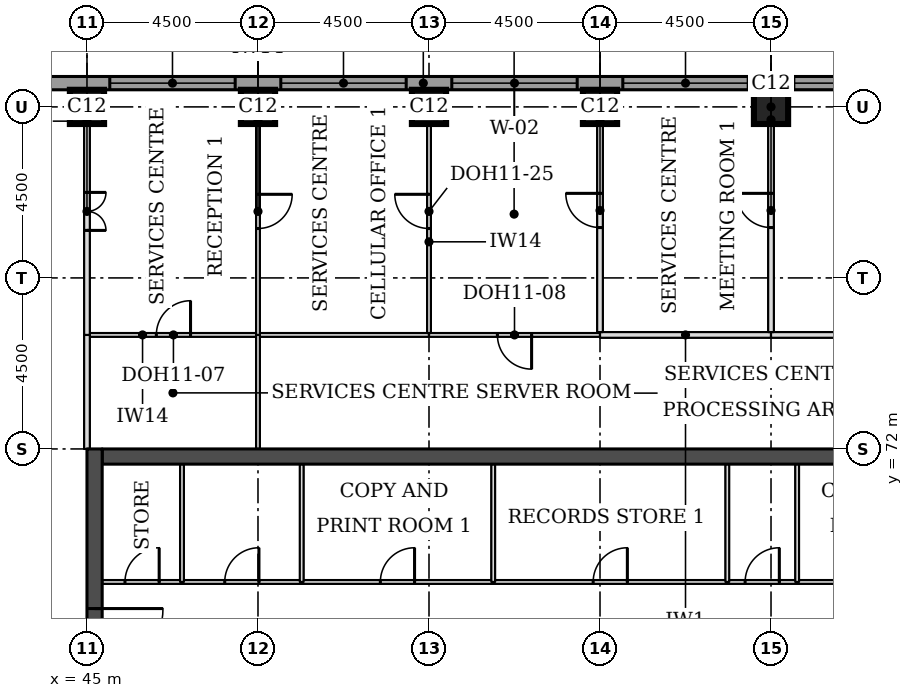
"""IFC4 building model, lengths in metres.
Left out: names, types, materials, properties, quantities, classifications, styles, units other than length and angle.
Written with IfcOpenShell. Run it as: python <this file> out.ifc"""

import sys

from ifc_helpers import new_model, si_unit, direction, frame, frame_2d, origin, origin_2d, place, context, subcontext, project, spatial, rectangle, extrude, element, fill, save


model = new_model("IFC4")
c1 = context("Model", 3, precision=1e-05, world=origin(), true_north=direction((0.0, 1.0)))
c2 = subcontext(c1, "Body", "Model", "MODEL_VIEW")
j1 = project(units=[si_unit("LENGTHUNIT", "METRE"), si_unit("PLANEANGLEUNIT", "RADIAN")], contexts=[c1])
p1 = place(None, origin())
s1 = spatial("IfcSite", under=j1, at=p1, CompositionType="ELEMENT")
p2 = place(p1, origin())
s2 = spatial("IfcBuilding", under=s1, at=p2, CompositionType="ELEMENT")
p3 = place(p2, frame((0.0, 0.0, 237.8)))
s3 = spatial("IfcBuildingStorey", under=s2, at=p3, CompositionType="ELEMENT", Elevation=237.8)
for number, where, z_axis, x_axis in (
    (1, (45.0, 81.0, 0.0), (0.0, 0.0, 1.0), (1.0, 0.0, 0.0)),
    (2, (49.5, 81.0, 0.0), (0.0, 0.0, 1.0), (1.0, 0.0, 0.0)),
    (3, (54.0, 81.0, 0.0), (0.0, 0.0, 1.0), (1.0, 0.0, 0.0)),
    (4, (58.5, 81.0, 0.0), (0.0, 0.0, 1.0), (1.0, 0.0, 0.0)),
    (5, (63.0, 81.0, 0.0), (0.0, 0.0, 1.0), (1.0, 0.0, 0.0)),
):
    element("IfcColumn", number, at=place(p3, frame(where, z_axis=z_axis, x_axis=x_axis)), inside=s3, PredefinedType="COLUMN", context=c2, shape_type="SweptSolid", body=[
        extrude(rectangle(XDim=0.9, YDim=0.9, at=origin_2d()), origin(), (0.0, 0.0, 1.0), 3.7),
    ])
p4 = place(p3, frame((45.4, 71.8, 0.0), z_axis=(0.0, 0.0, 1.0), x_axis=(1.0, 0.0, 0.0)))
e6 = element("IfcWall", 6, at=p4, inside=s3, PredefinedType="SHEAR", context=c2, shape_type="SweptSolid", body=[
    extrude(rectangle(XDim=21.7, YDim=0.4, at=frame_2d((10.85, 0.0))), origin(), (0.0, 0.0, 1.0), 3.7),
])
p5 = place(p3, frame((45.2, 49.5, 0.0), z_axis=(0.0, 0.0, 1.0), x_axis=(0.0, 1.0, 0.0)))
e7 = element("IfcWall", 7, at=p5, inside=s3, PredefinedType="SHEAR", context=c2, shape_type="SweptSolid", body=[
    extrude(rectangle(XDim=22.5, YDim=0.4, at=frame_2d((11.25, 0.0))), origin(), (0.0, 0.0, 1.0), 3.7),
])
p6 = place(p5, frame((4.2, 0.0, 0.0)))
e8 = element("IfcOpeningElement", 8, at=p6, cuts=e7, PredefinedType="OPENING", context=c2, shape_type="SweptSolid", body=[
    extrude(rectangle(XDim=1.8, YDim=2.1, at=frame_2d((0.9, 1.05))), frame((0.0, 0.21, 0.0), z_axis=(0.0, -1.0, 0.0), x_axis=(1.0, 0.0, 0.0)), (0.0, 0.0, 1.0), 0.42),
])
p7 = place(p5, frame((6.9, 0.0, 0.0)))
e9 = element("IfcOpeningElement", 9, at=p7, cuts=e7, PredefinedType="OPENING", context=c2, shape_type="SweptSolid", body=[
    extrude(rectangle(XDim=1.1, YDim=2.1, at=frame_2d((0.55, 1.05))), frame((0.0, 0.21, 0.0), z_axis=(0.0, -1.0, 0.0), x_axis=(1.0, 0.0, 0.0)), (0.0, 0.0, 1.0), 0.42),
])
p8 = place(p5, frame((13.6, 0.0, 0.0)))
e10 = element("IfcOpeningElement", 10, at=p8, cuts=e7, PredefinedType="OPENING", context=c2, shape_type="SweptSolid", body=[
    extrude(rectangle(XDim=1.1, YDim=2.1, at=frame_2d((0.55, 1.05))), frame((0.0, 0.21, 0.0), z_axis=(0.0, -1.0, 0.0), x_axis=(1.0, 0.0, 0.0)), (0.0, 0.0, 1.0), 0.42),
])
p9 = place(p5, frame((16.5, 0.0, 0.0)))
e11 = element("IfcOpeningElement", 11, at=p9, cuts=e7, PredefinedType="OPENING", context=c2, shape_type="SweptSolid", body=[
    extrude(rectangle(XDim=1.8, YDim=2.1, at=frame_2d((0.9, 1.05))), frame((0.0, 0.21, 0.0), z_axis=(0.0, -1.0, 0.0), x_axis=(1.0, 0.0, 0.0)), (0.0, 0.0, 1.0), 0.42),
])
p10 = place(p3, frame((72.331, 81.625, 0.0), z_axis=(0.0, 0.0, 1.0), x_axis=(-1.0, 0.0, 0.0)))
e12 = element("IfcWall", 12, at=p10, inside=s3, PredefinedType="STANDARD", context=c2, shape_type="SweptSolid", body=[
    extrude(rectangle(XDim=32.163, YDim=0.35, at=frame_2d((16.081, 0.0))), origin(), (0.0, 0.0, 1.0), 3.525),
])
p11 = place(p10, frame((5.431, 0.0, 0.9)))
e13 = element("IfcOpeningElement", 13, at=p11, cuts=e12, PredefinedType="OPENING", context=c2, shape_type="SweptSolid", body=[
    extrude(rectangle(XDim=3.3, YDim=1.9, at=frame_2d((1.65, 0.95))), frame((0.0, 0.185, 0.0), z_axis=(0.0, -1.0, 0.0), x_axis=(1.0, 0.0, 0.0)), (0.0, 0.0, 1.0), 0.37),
])
p12 = place(p10, frame((9.931, 0.0, 0.9)))
e14 = element("IfcOpeningElement", 14, at=p12, cuts=e12, PredefinedType="OPENING", context=c2, shape_type="SweptSolid", body=[
    extrude(rectangle(XDim=3.3, YDim=1.9, at=frame_2d((1.65, 0.95))), frame((0.0, 0.185, 0.0), z_axis=(0.0, -1.0, 0.0), x_axis=(1.0, 0.0, 0.0)), (0.0, 0.0, 1.0), 0.37),
])
p13 = place(p10, frame((14.431, 0.0, 0.9)))
e15 = element("IfcOpeningElement", 15, at=p13, cuts=e12, PredefinedType="OPENING", context=c2, shape_type="SweptSolid", body=[
    extrude(rectangle(XDim=3.3, YDim=1.9, at=frame_2d((1.65, 0.95))), frame((0.0, 0.185, 0.0), z_axis=(0.0, -1.0, 0.0), x_axis=(1.0, 0.0, 0.0)), (0.0, 0.0, 1.0), 0.37),
])
p14 = place(p10, frame((18.931, 0.0, 0.9)))
e16 = element("IfcOpeningElement", 16, at=p14, cuts=e12, PredefinedType="OPENING", context=c2, shape_type="SweptSolid", body=[
    extrude(rectangle(XDim=3.3, YDim=1.9, at=frame_2d((1.65, 0.95))), frame((0.0, 0.185, 0.0), z_axis=(0.0, -1.0, 0.0), x_axis=(1.0, 0.0, 0.0)), (0.0, 0.0, 1.0), 0.37),
])
p15 = place(p10, frame((23.431, 0.0, 0.9)))
e17 = element("IfcOpeningElement", 17, at=p15, cuts=e12, PredefinedType="OPENING", context=c2, shape_type="SweptSolid", body=[
    extrude(rectangle(XDim=3.3, YDim=1.9, at=frame_2d((1.65, 0.95))), frame((0.0, 0.185, 0.0), z_axis=(0.0, -1.0, 0.0), x_axis=(1.0, 0.0, 0.0)), (0.0, 0.0, 1.0), 0.37),
])
p16 = place(p3, frame((45.075, 75.0, 0.0), z_axis=(0.0, 0.0, 1.0), x_axis=(1.0, 0.0, 0.0)))
e18 = element("IfcWall", 18, at=p16, inside=s3, PredefinedType="PARTITIONING", context=c2, shape_type="SweptSolid", body=[
    extrude(rectangle(XDim=4.375, YDim=0.1, at=frame_2d((2.188, 0.0))), origin(), (0.0, 0.0, 1.0), 3.55),
])
p17 = place(p16, frame((1.75, 0.0, 0.0)))
e19 = element("IfcOpeningElement", 19, at=p17, cuts=e18, PredefinedType="OPENING", context=c2, shape_type="SweptSolid", body=[
    extrude(rectangle(XDim=0.9, YDim=2.1, at=frame_2d((0.45, 1.05))), frame((0.0, 0.06, 0.0), z_axis=(0.0, -1.0, 0.0), x_axis=(1.0, 0.0, 0.0)), (0.0, 0.0, 1.0), 0.12),
])
p18 = place(p3, frame((49.55, 75.0, 0.0), z_axis=(0.0, 0.0, 1.0), x_axis=(1.0, 0.0, 0.0)))
e20 = element("IfcWall", 20, at=p18, inside=s3, PredefinedType="PARTITIONING", context=c2, shape_type="SweptSolid", body=[
    extrude(rectangle(XDim=4.45, YDim=0.1, at=frame_2d((2.225, 0.0))), origin(), (0.0, 0.0, 1.0), 3.55),
])
p19 = place(p3, frame((54.0, 75.0, 0.0), z_axis=(0.0, 0.0, 1.0), x_axis=(1.0, 0.0, 0.0)))
e21 = element("IfcWall", 21, at=p19, inside=s3, PredefinedType="PARTITIONING", context=c2, shape_type="SweptSolid", body=[
    extrude(rectangle(XDim=4.5, YDim=0.1, at=frame_2d((2.25, 0.0))), origin(), (0.0, 0.0, 1.0), 3.55),
])
p20 = place(p19, frame((1.8, 0.0, 0.0)))
e22 = element("IfcOpeningElement", 22, at=p20, cuts=e21, PredefinedType="OPENING", context=c2, shape_type="SweptSolid", body=[
    extrude(rectangle(XDim=0.9, YDim=2.1, at=frame_2d((0.45, 1.05))), frame((0.0, 0.06, 0.0), z_axis=(0.0, -1.0, 0.0), x_axis=(1.0, 0.0, 0.0)), (0.0, 0.0, 1.0), 0.12),
])
p21 = place(p3, frame((58.5, 75.0, 0.0), z_axis=(0.0, 0.0, 1.0), x_axis=(1.0, 0.0, 0.0)))
e23 = element("IfcWall", 23, at=p21, inside=s3, PredefinedType="PARTITIONING", context=c2, shape_type="SweptSolid", body=[
    extrude(rectangle(XDim=4.5, YDim=0.15, at=frame_2d((2.25, 0.0))), origin(), (0.0, 0.0, 1.0), 3.55),
])
p22 = place(p3, frame((63.0, 75.0, 0.0), z_axis=(0.0, 0.0, 1.0), x_axis=(1.0, 0.0, 0.0)))
e24 = element("IfcWall", 24, at=p22, inside=s3, PredefinedType="PARTITIONING", context=c2, shape_type="SweptSolid", body=[
    extrude(rectangle(XDim=4.425, YDim=0.15, at=frame_2d((2.212, 0.0))), origin(), (0.0, 0.0, 1.0), 3.55),
])
p23 = place(p3, frame((45.0, 72.0, 0.0), z_axis=(0.0, 0.0, 1.0), x_axis=(0.0, 1.0, 0.0)))
e25 = element("IfcWall", 25, at=p23, inside=s3, PredefinedType="PARTITIONING", context=c2, shape_type="SweptSolid", body=[
    extrude(rectangle(XDim=3.0, YDim=0.15, at=frame_2d((1.5, 0.0))), origin(), (0.0, 0.0, 1.0), 3.022),
])
p24 = place(p3, frame((49.5, 72.0, 0.0), z_axis=(0.0, 0.0, 1.0), x_axis=(0.0, 1.0, 0.0)))
e26 = element("IfcWall", 26, at=p24, inside=s3, PredefinedType="PARTITIONING", context=c2, shape_type="SweptSolid", body=[
    extrude(rectangle(XDim=3.0, YDim=0.1, at=frame_2d((1.5, 0.0))), origin(), (0.0, 0.0, 1.0), 3.55),
])
p25 = place(p3, frame((45.0, 75.0, 0.0), z_axis=(0.0, 0.0, 1.0), x_axis=(0.0, 1.0, 0.0)))
e27 = element("IfcWall", 27, at=p25, inside=s3, PredefinedType="PARTITIONING", context=c2, shape_type="SweptSolid", body=[
    extrude(rectangle(XDim=6.45, YDim=0.15, at=frame_2d((3.225, 0.0))), origin(), (0.0, 0.0, 1.0), 3.022),
])
p26 = place(p25, frame((2.75, 0.0, 0.0)))
e28 = element("IfcOpeningElement", 28, at=p26, cuts=e27, PredefinedType="OPENING", context=c2, shape_type="SweptSolid", body=[
    extrude(rectangle(XDim=1.0, YDim=2.1, at=frame_2d((0.5, 1.05))), frame((0.0, 0.085, 0.0), z_axis=(0.0, -1.0, 0.0), x_axis=(1.0, 0.0, 0.0)), (0.0, 0.0, 1.0), 0.17),
])
p27 = place(p3, frame((49.5, 75.0, 0.0), z_axis=(0.0, 0.0, 1.0), x_axis=(0.0, 1.0, 0.0)))
e29 = element("IfcWall", 29, at=p27, inside=s3, PredefinedType="PARTITIONING", context=c2, shape_type="SweptSolid", body=[
    extrude(rectangle(XDim=6.45, YDim=0.1, at=frame_2d((3.225, 0.0))), origin(), (0.0, 0.0, 1.0), 3.55),
])
p28 = place(p27, frame((2.8, 0.0, 0.0)))
e30 = element("IfcOpeningElement", 30, at=p28, cuts=e29, PredefinedType="OPENING", context=c2, shape_type="SweptSolid", body=[
    extrude(rectangle(XDim=0.9, YDim=2.1, at=frame_2d((0.45, 1.05))), frame((0.0, 0.06, 0.0), z_axis=(0.0, -1.0, 0.0), x_axis=(1.0, 0.0, 0.0)), (0.0, 0.0, 1.0), 0.12),
])
p29 = place(p3, frame((54.0, 75.05, 0.0), z_axis=(0.0, 0.0, 1.0), x_axis=(0.0, 1.0, 0.0)))
e31 = element("IfcWall", 31, at=p29, inside=s3, PredefinedType="PARTITIONING", context=c2, shape_type="SweptSolid", body=[
    extrude(rectangle(XDim=6.4, YDim=0.1, at=frame_2d((3.2, 0.0))), origin(), (0.0, 0.0, 1.0), 3.55),
])
p30 = place(p29, frame((2.75, 0.0, 0.0)))
e32 = element("IfcOpeningElement", 32, at=p30, cuts=e31, PredefinedType="OPENING", context=c2, shape_type="SweptSolid", body=[
    extrude(rectangle(XDim=0.9, YDim=2.1, at=frame_2d((0.45, 1.05))), frame((0.0, 0.06, 0.0), z_axis=(0.0, -1.0, 0.0), x_axis=(1.0, 0.0, 0.0)), (0.0, 0.0, 1.0), 0.12),
])
p31 = place(p3, frame((58.5, 75.075, 0.0), z_axis=(0.0, 0.0, 1.0), x_axis=(0.0, 1.0, 0.0)))
e33 = element("IfcWall", 33, at=p31, inside=s3, PredefinedType="PARTITIONING", context=c2, shape_type="SweptSolid", body=[
    extrude(rectangle(XDim=6.375, YDim=0.15, at=frame_2d((3.188, 0.0))), origin(), (0.0, 0.0, 1.0), 3.55),
])
p32 = place(p31, frame((2.75, 0.0, 0.0)))
e34 = element("IfcOpeningElement", 34, at=p32, cuts=e33, PredefinedType="OPENING", context=c2, shape_type="SweptSolid", body=[
    extrude(rectangle(XDim=0.9, YDim=2.1, at=frame_2d((0.45, 1.05))), frame((0.0, 0.085, 0.0), z_axis=(0.0, -1.0, 0.0), x_axis=(1.0, 0.0, 0.0)), (0.0, 0.0, 1.0), 0.17),
])
p33 = place(p3, frame((63.0, 75.075, 0.0), z_axis=(0.0, 0.0, 1.0), x_axis=(0.0, 1.0, 0.0)))
e35 = element("IfcWall", 35, at=p33, inside=s3, PredefinedType="PARTITIONING", context=c2, shape_type="SweptSolid", body=[
    extrude(rectangle(XDim=6.375, YDim=0.15, at=frame_2d((3.188, 0.0))), origin(), (0.0, 0.0, 1.0), 3.55),
])
p34 = place(p33, frame((2.75, 0.0, 0.0)))
e36 = element("IfcOpeningElement", 36, at=p34, cuts=e35, PredefinedType="OPENING", context=c2, shape_type="SweptSolid", body=[
    extrude(rectangle(XDim=0.9, YDim=2.1, at=frame_2d((0.45, 1.05))), frame((0.0, 0.085, 0.0), z_axis=(0.0, -1.0, 0.0), x_axis=(1.0, 0.0, 0.0)), (0.0, 0.0, 1.0), 0.17),
])
p35 = place(p3, frame((45.4, 68.5, 0.0), z_axis=(0.0, 0.0, 1.0), x_axis=(1.0, 0.0, 0.0)))
e37 = element("IfcWall", 37, at=p35, inside=s3, PredefinedType="PARTITIONING", context=c2, shape_type="SweptSolid", body=[
    extrude(rectangle(XDim=21.7, YDim=0.1, at=frame_2d((10.85, 0.0))), origin(), (0.0, 0.0, 1.0), 3.55),
])
p36 = place(p35, frame((19.544, 0.0, 0.0)))
e38 = element("IfcOpeningElement", 38, at=p36, cuts=e37, PredefinedType="OPENING", context=c2, shape_type="SweptSolid", body=[
    extrude(rectangle(XDim=0.9, YDim=2.1, at=frame_2d((0.45, 1.05))), frame((0.0, 0.06, 0.0), z_axis=(0.0, -1.0, 0.0), x_axis=(1.0, 0.0, 0.0)), (0.0, 0.0, 1.0), 0.12),
])
p37 = place(p35, frame((16.919, 0.0, 0.0)))
e39 = element("IfcOpeningElement", 39, at=p37, cuts=e37, PredefinedType="OPENING", context=c2, shape_type="SweptSolid", body=[
    extrude(rectangle(XDim=0.9, YDim=2.1, at=frame_2d((0.45, 1.05))), frame((0.0, 0.06, 0.0), z_axis=(0.0, -1.0, 0.0), x_axis=(1.0, 0.0, 0.0)), (0.0, 0.0, 1.0), 0.12),
])
p38 = place(p35, frame((0.6, 0.0, 0.0)))
e40 = element("IfcOpeningElement", 40, at=p38, cuts=e37, PredefinedType="OPENING", context=c2, shape_type="SweptSolid", body=[
    extrude(rectangle(XDim=0.9, YDim=2.1, at=frame_2d((0.45, 1.05))), frame((0.0, 0.06, 0.0), z_axis=(0.0, -1.0, 0.0), x_axis=(1.0, 0.0, 0.0)), (0.0, 0.0, 1.0), 0.12),
])
p39 = place(p35, frame((3.225, 0.0, 0.0)))
e41 = element("IfcOpeningElement", 41, at=p39, cuts=e37, PredefinedType="OPENING", context=c2, shape_type="SweptSolid", body=[
    extrude(rectangle(XDim=0.9, YDim=2.1, at=frame_2d((0.45, 1.05))), frame((0.0, 0.06, 0.0), z_axis=(0.0, -1.0, 0.0), x_axis=(1.0, 0.0, 0.0)), (0.0, 0.0, 1.0), 0.12),
])
p40 = place(p35, frame((12.92, 0.0, 0.0)))
e42 = element("IfcOpeningElement", 42, at=p40, cuts=e37, PredefinedType="OPENING", context=c2, shape_type="SweptSolid", body=[
    extrude(rectangle(XDim=0.9, YDim=2.1, at=frame_2d((0.45, 1.05))), frame((0.0, 0.06, 0.0), z_axis=(0.0, -1.0, 0.0), x_axis=(1.0, 0.0, 0.0)), (0.0, 0.0, 1.0), 0.12),
])
p41 = place(p35, frame((7.32, 0.0, 0.0)))
e43 = element("IfcOpeningElement", 43, at=p41, cuts=e37, PredefinedType="OPENING", context=c2, shape_type="SweptSolid", body=[
    extrude(rectangle(XDim=0.9, YDim=2.1, at=frame_2d((0.45, 1.05))), frame((0.0, 0.06, 0.0), z_axis=(0.0, -1.0, 0.0), x_axis=(1.0, 0.0, 0.0)), (0.0, 0.0, 1.0), 0.12),
])
for number, where, z_axis, x_axis in (
    (44, (47.5, 68.5, 0.0), (0.0, 0.0, 1.0), (0.0, 1.0, 0.0)),
    (45, (50.65, 68.5, 0.0), (0.0, 0.0, 1.0), (0.0, 1.0, 0.0)),
    (46, (55.69, 68.5, 0.0), (0.0, 0.0, 1.0), (0.0, 1.0, 0.0)),
    (47, (61.85, 68.5, 0.0), (0.0, 0.0, 1.0), (0.0, 1.0, 0.0)),
    (48, (63.688, 68.5, 0.0), (0.0, 0.0, 1.0), (0.0, 1.0, 0.0)),
):
    element("IfcWall", number, at=place(p3, frame(where, z_axis=z_axis, x_axis=x_axis)), inside=s3, PredefinedType="PARTITIONING", context=c2, shape_type="SweptSolid", body=[
        extrude(rectangle(XDim=3.1, YDim=0.1, at=frame_2d((1.55, 0.0))), origin(), (0.0, 0.0, 1.0), 3.55),
    ])
p42 = place(p11, origin())
e49 = element("IfcWindow", 49, at=p42, inside=s3, PartitioningType="SINGLE_PANEL", PredefinedType="WINDOW", context=c2, shape_type="SweptSolid", body=[
    extrude(rectangle(XDim=3.3, YDim=1.9, at=frame_2d((1.65, 0.95))), frame((0.0, 0.085, 0.0), z_axis=(0.0, -1.0, 0.0), x_axis=(1.0, 0.0, 0.0)), (0.0, 0.0, 1.0), 0.06),
])
fill(e13, e49)
p43 = place(p12, origin())
e50 = element("IfcWindow", 50, at=p43, inside=s3, PartitioningType="SINGLE_PANEL", PredefinedType="WINDOW", context=c2, shape_type="SweptSolid", body=[
    extrude(rectangle(XDim=3.3, YDim=1.9, at=frame_2d((1.65, 0.95))), frame((0.0, 0.085, 0.0), z_axis=(0.0, -1.0, 0.0), x_axis=(1.0, 0.0, 0.0)), (0.0, 0.0, 1.0), 0.06),
])
fill(e14, e50)
p44 = place(p13, origin())
e51 = element("IfcWindow", 51, at=p44, inside=s3, PartitioningType="SINGLE_PANEL", PredefinedType="WINDOW", context=c2, shape_type="SweptSolid", body=[
    extrude(rectangle(XDim=3.3, YDim=1.9, at=frame_2d((1.65, 0.95))), frame((0.0, 0.085, 0.0), z_axis=(0.0, -1.0, 0.0), x_axis=(1.0, 0.0, 0.0)), (0.0, 0.0, 1.0), 0.06),
])
fill(e15, e51)
p45 = place(p14, origin())
e52 = element("IfcWindow", 52, at=p45, inside=s3, PartitioningType="SINGLE_PANEL", PredefinedType="WINDOW", context=c2, shape_type="SweptSolid", body=[
    extrude(rectangle(XDim=3.3, YDim=1.9, at=frame_2d((1.65, 0.95))), frame((0.0, 0.085, 0.0), z_axis=(0.0, -1.0, 0.0), x_axis=(1.0, 0.0, 0.0)), (0.0, 0.0, 1.0), 0.06),
])
fill(e16, e52)
p46 = place(p15, origin())
e53 = element("IfcWindow", 53, at=p46, inside=s3, PartitioningType="SINGLE_PANEL", PredefinedType="WINDOW", context=c2, shape_type="SweptSolid", body=[
    extrude(rectangle(XDim=3.3, YDim=1.9, at=frame_2d((1.65, 0.95))), frame((0.0, 0.085, 0.0), z_axis=(0.0, -1.0, 0.0), x_axis=(1.0, 0.0, 0.0)), (0.0, 0.0, 1.0), 0.06),
])
fill(e17, e53)
p47 = place(p26, frame((1.0, 0.0, 0.0), z_axis=(0.0, 0.0, 1.0), x_axis=(-1.0, 0.0, 0.0)))
e54 = element("IfcDoor", 54, at=p47, inside=s3, OperationType="DOUBLE_DOOR_SINGLE_SWING", PredefinedType="DOOR", context=c2, shape_type="SweptSolid", body=[
    extrude(rectangle(XDim=1.0, YDim=2.1, at=frame_2d((0.5, 1.05))), frame((0.0, 0.025, 0.0), z_axis=(0.0, -1.0, 0.0), x_axis=(1.0, 0.0, 0.0)), (0.0, 0.0, 1.0), 0.05),
])
fill(e28, e54)
p48 = place(p28, frame((0.9, 0.0, 0.0), z_axis=(0.0, 0.0, 1.0), x_axis=(-1.0, 0.0, 0.0)))
e55 = element("IfcDoor", 55, at=p48, inside=s3, OperationType="SINGLE_SWING_LEFT", PredefinedType="DOOR", context=c2, shape_type="SweptSolid", body=[
    extrude(rectangle(XDim=0.9, YDim=2.1, at=frame_2d((0.45, 1.05))), frame((0.0, 0.025, 0.0), z_axis=(0.0, -1.0, 0.0), x_axis=(1.0, 0.0, 0.0)), (0.0, 0.0, 1.0), 0.05),
])
fill(e30, e55)
p49 = place(p30, origin())
e56 = element("IfcDoor", 56, at=p49, inside=s3, OperationType="SINGLE_SWING_RIGHT", PredefinedType="DOOR", context=c2, shape_type="SweptSolid", body=[
    extrude(rectangle(XDim=0.9, YDim=2.1, at=frame_2d((0.45, 1.05))), frame((0.0, 0.025, 0.0), z_axis=(0.0, -1.0, 0.0), x_axis=(1.0, 0.0, 0.0)), (0.0, 0.0, 1.0), 0.05),
])
fill(e32, e56)
p50 = place(p32, origin())
e57 = element("IfcDoor", 57, at=p50, inside=s3, OperationType="SINGLE_SWING_RIGHT", PredefinedType="DOOR", context=c2, shape_type="SweptSolid", body=[
    extrude(rectangle(XDim=0.9, YDim=2.1, at=frame_2d((0.45, 1.05))), frame((0.0, 0.025, 0.0), z_axis=(0.0, -1.0, 0.0), x_axis=(1.0, 0.0, 0.0)), (0.0, 0.0, 1.0), 0.05),
])
fill(e34, e57)
p51 = place(p34, origin())
e58 = element("IfcDoor", 58, at=p51, inside=s3, OperationType="SINGLE_SWING_RIGHT", PredefinedType="DOOR", context=c2, shape_type="SweptSolid", body=[
    extrude(rectangle(XDim=0.9, YDim=2.1, at=frame_2d((0.45, 1.05))), frame((0.0, 0.025, 0.0), z_axis=(0.0, -1.0, 0.0), x_axis=(1.0, 0.0, 0.0)), (0.0, 0.0, 1.0), 0.05),
])
fill(e36, e58)
p52 = place(p17, origin())
e59 = element("IfcDoor", 59, at=p52, inside=s3, OperationType="SINGLE_SWING_RIGHT", PredefinedType="DOOR", context=c2, shape_type="SweptSolid", body=[
    extrude(rectangle(XDim=0.9, YDim=2.1, at=frame_2d((0.45, 1.05))), frame((0.0, 0.025, 0.0), z_axis=(0.0, -1.0, 0.0), x_axis=(1.0, 0.0, 0.0)), (0.0, 0.0, 1.0), 0.05),
])
fill(e19, e59)
p53 = place(p20, frame((0.9, 0.0, 0.0), z_axis=(0.0, 0.0, 1.0), x_axis=(-1.0, 0.0, 0.0)))
e60 = element("IfcDoor", 60, at=p53, inside=s3, OperationType="SINGLE_SWING_LEFT", PredefinedType="DOOR", context=c2, shape_type="SweptSolid", body=[
    extrude(rectangle(XDim=0.9, YDim=2.1, at=frame_2d((0.45, 1.05))), frame((0.0, 0.025, 0.0), z_axis=(0.0, -1.0, 0.0), x_axis=(1.0, 0.0, 0.0)), (0.0, 0.0, 1.0), 0.05),
])
fill(e22, e60)
p54 = place(p9, frame((1.8, 0.0, 0.0), z_axis=(0.0, 0.0, 1.0), x_axis=(-1.0, 0.0, 0.0)))
e61 = element("IfcDoor", 61, at=p54, inside=s3, OperationType="SINGLE_SWING_LEFT", PredefinedType="DOOR", context=c2, shape_type="SweptSolid", body=[
    extrude(rectangle(XDim=1.8, YDim=2.1, at=frame_2d((0.9, 1.05))), frame((0.0, 0.025, 0.0), z_axis=(0.0, -1.0, 0.0), x_axis=(1.0, 0.0, 0.0)), (0.0, 0.0, 1.0), 0.05),
])
fill(e11, e61)
p55 = place(p37, origin())
e62 = element("IfcDoor", 62, at=p55, inside=s3, OperationType="SINGLE_SWING_RIGHT", PredefinedType="DOOR", context=c2, shape_type="SweptSolid", body=[
    extrude(rectangle(XDim=0.9, YDim=2.1, at=frame_2d((0.45, 1.05))), frame((0.0, 0.025, 0.0), z_axis=(0.0, -1.0, 0.0), x_axis=(1.0, 0.0, 0.0)), (0.0, 0.0, 1.0), 0.05),
])
fill(e39, e62)
p56 = place(p38, origin())
e63 = element("IfcDoor", 63, at=p56, inside=s3, OperationType="SINGLE_SWING_RIGHT", PredefinedType="DOOR", context=c2, shape_type="SweptSolid", body=[
    extrude(rectangle(XDim=0.9, YDim=2.1, at=frame_2d((0.45, 1.05))), frame((0.0, 0.025, 0.0), z_axis=(0.0, -1.0, 0.0), x_axis=(1.0, 0.0, 0.0)), (0.0, 0.0, 1.0), 0.05),
])
fill(e40, e63)
p57 = place(p39, origin())
e64 = element("IfcDoor", 64, at=p57, inside=s3, OperationType="SINGLE_SWING_RIGHT", PredefinedType="DOOR", context=c2, shape_type="SweptSolid", body=[
    extrude(rectangle(XDim=0.9, YDim=2.1, at=frame_2d((0.45, 1.05))), frame((0.0, 0.025, 0.0), z_axis=(0.0, -1.0, 0.0), x_axis=(1.0, 0.0, 0.0)), (0.0, 0.0, 1.0), 0.05),
])
fill(e41, e64)
p58 = place(p40, origin())
e65 = element("IfcDoor", 65, at=p58, inside=s3, OperationType="SINGLE_SWING_RIGHT", PredefinedType="DOOR", context=c2, shape_type="SweptSolid", body=[
    extrude(rectangle(XDim=0.9, YDim=2.1, at=frame_2d((0.45, 1.05))), frame((0.0, 0.025, 0.0), z_axis=(0.0, -1.0, 0.0), x_axis=(1.0, 0.0, 0.0)), (0.0, 0.0, 1.0), 0.05),
])
fill(e42, e65)
p59 = place(p41, origin())
e66 = element("IfcDoor", 66, at=p59, inside=s3, OperationType="SINGLE_SWING_RIGHT", PredefinedType="DOOR", context=c2, shape_type="SweptSolid", body=[
    extrude(rectangle(XDim=0.9, YDim=2.1, at=frame_2d((0.45, 1.05))), frame((0.0, 0.025, 0.0), z_axis=(0.0, -1.0, 0.0), x_axis=(1.0, 0.0, 0.0)), (0.0, 0.0, 1.0), 0.05),
])
fill(e43, e66)
save(model, sys.argv[1])
